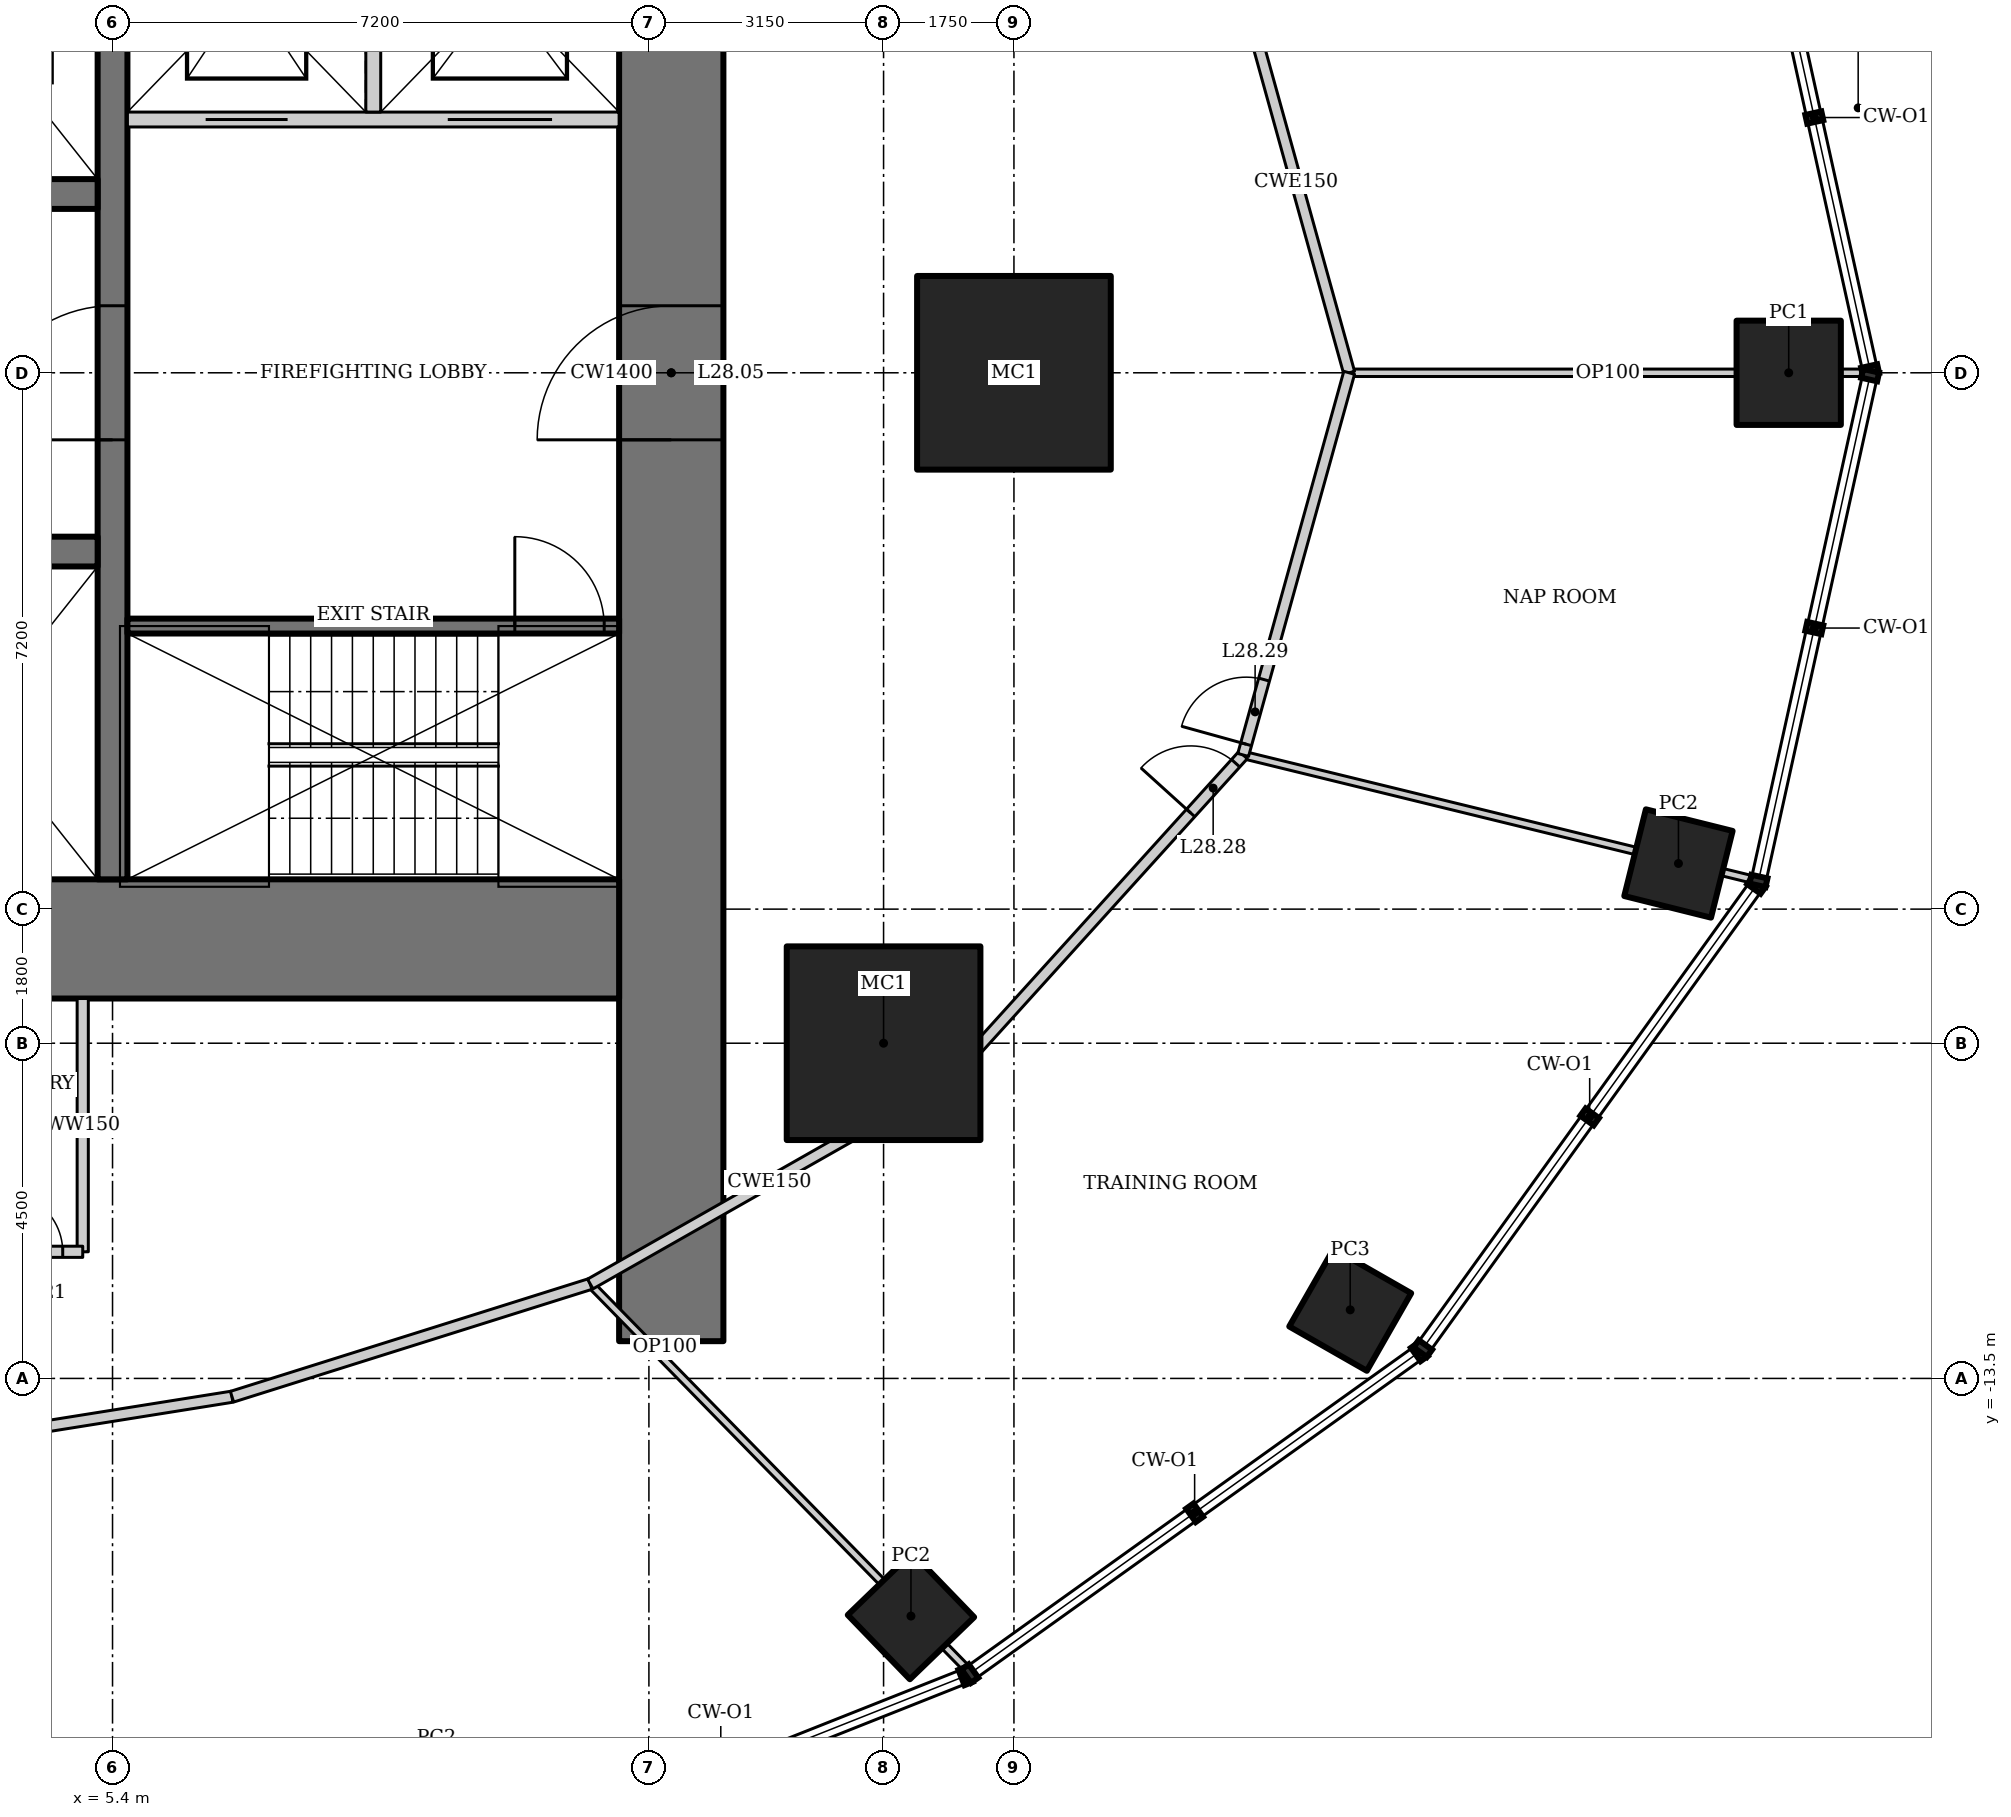
"""IFC4 building model, lengths in metres.
Left out: names, types, materials, properties, quantities, classifications, styles, units other than length and angle.
Written with IfcOpenShell. Run it as: python <this file> out.ifc"""

import sys

from ifc_helpers import new_model, si_unit, direction, frame, frame_2d, origin, origin_2d, place, context, subcontext, project, spatial, rectangle, hollow_rectangle, extrude, element, fill, save


model = new_model("IFC4")
c1 = context("Model", 3, precision=1e-05, world=origin(), true_north=direction((0.0, 1.0)))
c2 = subcontext(c1, "Body", "Model", "MODEL_VIEW")
j1 = project(units=[si_unit("LENGTHUNIT", "METRE"), si_unit("PLANEANGLEUNIT", "RADIAN")], contexts=[c1])
p1 = place(None, origin())
s1 = spatial("IfcSite", under=j1, at=p1, CompositionType="ELEMENT")
p2 = place(p1, origin())
s2 = spatial("IfcBuilding", under=s1, at=p2, CompositionType="ELEMENT")
p3 = place(p2, frame((0.0, 0.0, 121.6)))
s3 = spatial("IfcBuildingStorey", under=s2, at=p3, CompositionType="ELEMENT", Elevation=121.6)
for number, where, z_axis, x_axis in (
    (1, (17.5, 0.0, 0.0), (0.0, 0.0, 1.0), (1.0, 0.0, 0.0)),
    (2, (15.75, -9.0, 0.0), (0.0, 0.0, 1.0), (1.0, 0.0, 0.0)),
):
    element("IfcColumn", number, at=place(p3, frame(where, z_axis=z_axis, x_axis=x_axis)), inside=s3, PredefinedType="COLUMN", context=c2, shape_type="SweptSolid", body=[
        extrude(hollow_rectangle(XDim=2.6, YDim=2.6, WallThickness=0.13, at=origin_2d()), origin(), (0.0, 0.0, 1.0), 4.2),
    ])
p4 = place(p3, frame((27.9, 0.0, 0.0), z_axis=(0.0, 0.0, 1.0), x_axis=(1.0, 0.0, 0.0)))
e3 = element("IfcColumn", 3, at=p4, inside=s3, PredefinedType="COLUMN", context=c2, shape_type="SweptSolid", body=[
    extrude(hollow_rectangle(XDim=1.4, YDim=1.4, WallThickness=0.1, at=origin_2d()), origin(), (0.0, 0.0, 1.0), 4.2),
])
for number, where, z_axis, x_axis in (
    (4, (9.749, -19.133, 0.0), (0.0, 0.0, 1.0), (0.891, 0.454, 0.0)),
    (5, (16.118, -16.69, 0.0), (0.0, 0.0, 1.0), (0.719, 0.695, 0.0)),
):
    element("IfcColumn", number, at=place(p3, frame(where, z_axis=z_axis, x_axis=x_axis)), inside=s3, PredefinedType="COLUMN", context=c2, shape_type="SweptSolid", body=[
        extrude(hollow_rectangle(XDim=1.2, YDim=1.2, WallThickness=0.1, at=origin_2d()), origin(), (0.0, 0.0, 1.0), 4.2),
    ])
p5 = place(p3, frame((22.014, -12.579, 0.0), z_axis=(0.0, 0.0, 1.0), x_axis=(0.496139221777, 0.86824298017, 0.0)))
e6 = element("IfcColumn", 6, at=p5, inside=s3, PredefinedType="COLUMN", context=c2, shape_type="SweptSolid", body=[
    extrude(hollow_rectangle(XDim=1.2, YDim=1.2, WallThickness=0.12, at=origin_2d()), origin(), (0.0, 0.0, 1.0), 4.2),
])
p6 = place(p3, frame((26.42, -6.587, 0.0), z_axis=(0.0, 0.0, 1.0), x_axis=(0.2419218956, 0.970295726276, 0.0)))
e7 = element("IfcColumn", 7, at=p6, inside=s3, PredefinedType="COLUMN", context=c2, shape_type="SweptSolid", body=[
    extrude(hollow_rectangle(XDim=1.2, YDim=1.2, WallThickness=0.1, at=origin_2d()), origin(), (0.0, 0.0, 1.0), 4.2),
])
p7 = place(p3, frame((12.9, -13.0, 0.0), z_axis=(0.0, 0.0, 1.0), x_axis=(0.0, 1.0, 0.0)))
e8 = element("IfcWall", 8, at=p7, inside=s3, PredefinedType="SHEAR", context=c2, shape_type="SweptSolid", body=[
    extrude(rectangle(XDim=26.0, YDim=1.4, at=frame_2d((13.0, 0.0))), origin(), (0.0, 0.0, 1.0), 4.2),
])
p8 = place(p7, frame((12.1, 0.0, 0.0)))
e9 = element("IfcOpeningElement", 9, at=p8, cuts=e8, PredefinedType="OPENING", context=c2, shape_type="SweptSolid", body=[
    extrude(rectangle(XDim=1.8, YDim=2.1, at=frame_2d((0.9, 1.05))), frame((0.0, 0.71, 0.0), z_axis=(0.0, -1.0, 0.0), x_axis=(1.0, 0.0, 0.0)), (0.0, 0.0, 1.0), 1.42),
])
p9 = place(p3, frame((-12.2, -7.6, 0.0), z_axis=(0.0, 0.0, 1.0), x_axis=(1.0, 0.0, 0.0)))
e10 = element("IfcWall", 10, at=p9, inside=s3, PredefinedType="SHEAR", context=c2, shape_type="SweptSolid", body=[
    extrude(rectangle(XDim=24.4, YDim=1.6, at=frame_2d((12.2, 0.0))), origin(), (0.0, 0.0, 1.0), 4.2),
])
p10 = place(p3, frame((5.4, -6.8, 0.0), z_axis=(0.0, 0.0, 1.0), x_axis=(0.0, 1.0, 0.0)))
e11 = element("IfcWall", 11, at=p10, inside=s3, PredefinedType="SHEAR", context=c2, shape_type="SweptSolid", body=[
    extrude(rectangle(XDim=13.6, YDim=0.4, at=frame_2d((6.8, 0.0))), origin(), (0.0, 0.0, 1.0), 4.2),
])
p11 = place(p10, frame((5.9, 0.0, 0.0)))
e12 = element("IfcOpeningElement", 12, at=p11, cuts=e11, PredefinedType="OPENING", context=c2, shape_type="SweptSolid", body=[
    extrude(rectangle(XDim=1.8, YDim=2.1, at=frame_2d((0.9, 1.05))), frame((0.0, 0.21, 0.0), z_axis=(0.0, -1.0, 0.0), x_axis=(1.0, 0.0, 0.0)), (0.0, 0.0, 1.0), 0.42),
])
p12 = place(p3, frame((-5.2, -2.4, 0.0), z_axis=(0.0, 0.0, 1.0), x_axis=(1.0, 0.0, 0.0)))
e13 = element("IfcWall", 13, at=p12, inside=s3, PredefinedType="SHEAR", context=c2, shape_type="SweptSolid", body=[
    extrude(rectangle(XDim=10.4, YDim=0.4, at=frame_2d((5.2, 0.0))), origin(), (0.0, 0.0, 1.0), 4.2),
])
p13 = place(p3, frame((5.2, 2.4, 0.0), z_axis=(0.0, 0.0, 1.0), x_axis=(-1.0, 0.0, 0.0)))
e14 = element("IfcWall", 14, at=p13, inside=s3, PredefinedType="SHEAR", context=c2, shape_type="SweptSolid", body=[
    extrude(rectangle(XDim=10.4, YDim=0.4, at=frame_2d((5.2, 0.0))), origin(), (0.0, 0.0, 1.0), 4.2),
])
p14 = place(p13, frame((8.183, 0.0, 0.0)))
e15 = element("IfcOpeningElement", 15, at=p14, cuts=e14, PredefinedType="OPENING", context=c2, shape_type="SweptSolid", body=[
    extrude(rectangle(XDim=1.1, YDim=2.2, at=frame_2d((0.55, 1.1))), frame((0.0, 0.21, 0.0), z_axis=(0.0, -1.0, 0.0), x_axis=(1.0, 0.0, 0.0)), (0.0, 0.0, 1.0), 0.42),
])
p15 = place(p13, frame((4.65, 0.0, 0.0)))
e16 = element("IfcOpeningElement", 16, at=p15, cuts=e14, PredefinedType="OPENING", context=c2, shape_type="SweptSolid", body=[
    extrude(rectangle(XDim=1.1, YDim=2.2, at=frame_2d((0.55, 1.1))), frame((0.0, 0.21, 0.0), z_axis=(0.0, -1.0, 0.0), x_axis=(1.0, 0.0, 0.0)), (0.0, 0.0, 1.0), 0.42),
])
p16 = place(p13, frame((1.117, 0.0, 0.0)))
e17 = element("IfcOpeningElement", 17, at=p16, cuts=e14, PredefinedType="OPENING", context=c2, shape_type="SweptSolid", body=[
    extrude(rectangle(XDim=1.1, YDim=2.2, at=frame_2d((0.55, 1.1))), frame((0.0, 0.21, 0.0), z_axis=(0.0, -1.0, 0.0), x_axis=(1.0, 0.0, 0.0)), (0.0, 0.0, 1.0), 0.42),
])
p17 = place(p3, frame((5.6, -3.4, 0.0), z_axis=(0.0, 0.0, 1.0), x_axis=(1.0, 0.0, 0.0)))
e18 = element("IfcWall", 18, at=p17, inside=s3, PredefinedType="SHEAR", context=c2, shape_type="SweptSolid", body=[
    extrude(rectangle(XDim=6.6, YDim=0.2, at=frame_2d((3.3, 0.0))), origin(), (0.0, 0.0, 1.0), 4.2),
])
p18 = place(p17, frame((5.2, 0.0, 0.0)))
e19 = element("IfcOpeningElement", 19, at=p18, cuts=e18, PredefinedType="OPENING", context=c2, shape_type="SweptSolid", body=[
    extrude(rectangle(XDim=1.2, YDim=2.1, at=frame_2d((0.6, 1.05))), frame((0.0, 0.11, 0.0), z_axis=(0.0, -1.0, 0.0), x_axis=(1.0, 0.0, 0.0)), (0.0, 0.0, 1.0), 0.22),
])
p19 = place(p3, frame((12.2, 3.4, 0.0), z_axis=(0.0, 0.0, 1.0), x_axis=(-1.0, 0.0, 0.0)))
e20 = element("IfcWall", 20, at=p19, inside=s3, PredefinedType="SOLIDWALL", context=c2, shape_type="SweptSolid", body=[
    extrude(rectangle(XDim=6.6, YDim=0.2, at=frame_2d((3.3, 0.0))), origin(), (0.0, 0.0, 1.0), 4.2),
])
p20 = place(p19, frame((4.45, 0.0, 0.0)))
e21 = element("IfcOpeningElement", 21, at=p20, cuts=e20, PredefinedType="OPENING", context=c2, shape_type="SweptSolid", body=[
    extrude(rectangle(XDim=1.1, YDim=2.2, at=frame_2d((0.55, 1.1))), frame((0.0, 0.11, 0.0), z_axis=(0.0, -1.0, 0.0), x_axis=(1.0, 0.0, 0.0)), (0.0, 0.0, 1.0), 0.22),
])
p21 = place(p19, frame((0.9, 0.0, 0.0)))
e22 = element("IfcOpeningElement", 22, at=p21, cuts=e20, PredefinedType="OPENING", context=c2, shape_type="SweptSolid", body=[
    extrude(rectangle(XDim=1.4, YDim=2.2, at=frame_2d((0.7, 1.1))), frame((0.0, 0.11, 0.0), z_axis=(0.0, -1.0, 0.0), x_axis=(1.0, 0.0, 0.0)), (0.0, 0.0, 1.0), 0.22),
])
p22 = place(p3, frame((8.9, 3.5, 0.0), z_axis=(0.0, 0.0, 1.0), x_axis=(0.0, 1.0, 0.0)))
e23 = element("IfcWall", 23, at=p22, inside=s3, PredefinedType="SOLIDWALL", context=c2, shape_type="SweptSolid", body=[
    extrude(rectangle(XDim=3.3, YDim=0.2, at=frame_2d((1.65, 0.0))), origin(), (0.0, 0.0, 1.0), 4.2),
])
p23 = place(p3, frame((28.944, 0.0, 0.0), z_axis=(0.0, 0.0, 1.0), x_axis=(-1.0, 0.0, 0.0)))
e24 = element("IfcWall", 24, at=p23, inside=s3, PredefinedType="PARTITIONING", context=c2, shape_type="SweptSolid", body=[
    extrude(rectangle(XDim=6.944, YDim=0.1, at=frame_2d((3.472, 0.0))), origin(), (0.0, 0.0, 1.0), 3.204),
])
p24 = place(p3, frame((16.882, -17.414, 0.0), z_axis=(0.0, 0.0, 1.0), x_axis=(-0.699352142517, 0.714777294517, 0.0)))
e25 = element("IfcWall", 25, at=p24, inside=s3, PredefinedType="PARTITIONING", context=c2, shape_type="SweptSolid", body=[
    extrude(rectangle(XDim=7.249, YDim=0.1, at=frame_2d((3.625, 0.0))), origin(), (0.0, 0.0, 1.0), 3.321),
])
p25 = place(p3, frame((27.441, -6.809, 0.0), z_axis=(0.0, 0.0, 1.0), x_axis=(-0.971377572955, 0.237540755996, 0.0)))
e26 = element("IfcWall", 26, at=p25, inside=s3, PredefinedType="PARTITIONING", context=c2, shape_type="SweptSolid", body=[
    extrude(rectangle(XDim=7.066, YDim=0.1, at=frame_2d((3.533, 0.0))), origin(), (0.0, 0.0, 1.0), 3.113),
])
p26 = place(p3, frame((22.0, 0.0, 0.0), z_axis=(0.0, 0.0, 1.0), x_axis=(-0.267293817428, 0.963615076244, 0.0)))
e27 = element("IfcWall", 27, at=p26, inside=s3, PredefinedType="PARTITIONING", context=c2, shape_type="SweptSolid", body=[
    extrude(rectangle(XDim=5.324, YDim=0.15, at=frame_2d((2.662, 0.0))), origin(), (0.0, 0.0, 1.0), 4.05),
])
p27 = place(p3, frame((3.31, -14.335, 0.0), z_axis=(0.0, 0.0, 1.0), x_axis=(0.987511396594, 0.157547585181, 0.0)))
e28 = element("IfcWall", 28, at=p27, inside=s3, PredefinedType="PARTITIONING", context=c2, shape_type="SweptSolid", body=[
    extrude(rectangle(XDim=3.741, YDim=0.15, at=frame_2d((1.87, 0.0))), origin(), (0.0, 0.0, 1.0), 4.05),
])
p28 = place(p3, frame((7.004, -13.746, 0.0), z_axis=(0.0, 0.0, 1.0), x_axis=(0.953893934057, 0.300143903101, 0.0)))
e29 = element("IfcWall", 29, at=p28, inside=s3, PredefinedType="PARTITIONING", context=c2, shape_type="SweptSolid", body=[
    extrude(rectangle(XDim=5.042, YDim=0.15, at=frame_2d((2.521, 0.0))), origin(), (0.0, 0.0, 1.0), 4.05),
])
p29 = place(p3, frame((11.813, -12.232, 0.0), z_axis=(0.0, 0.0, 1.0), x_axis=(0.869375991036, 0.494151177485, 0.0)))
e30 = element("IfcWall", 30, at=p29, inside=s3, PredefinedType="PARTITIONING", context=c2, shape_type="SweptSolid", body=[
    extrude(rectangle(XDim=5.532, YDim=0.15, at=frame_2d((2.766, 0.0))), origin(), (0.0, 0.0, 1.0), 4.05),
])
p30 = place(p3, frame((16.623, -9.499, 0.0), z_axis=(0.0, 0.0, 1.0), x_axis=(0.671118353743, 0.741350224435, 0.0)))
e31 = element("IfcWall", 31, at=p30, inside=s3, PredefinedType="PARTITIONING", context=c2, shape_type="SweptSolid", body=[
    extrude(rectangle(XDim=5.892, YDim=0.15, at=frame_2d((2.946, 0.0))), origin(), (0.0, 0.0, 1.0), 4.05),
])
p31 = place(p30, frame((4.842, 0.0, 0.0)))
e32 = element("IfcOpeningElement", 32, at=p31, cuts=e31, PredefinedType="OPENING", context=c2, shape_type="SweptSolid", body=[
    extrude(rectangle(XDim=0.9, YDim=2.1, at=frame_2d((0.45, 1.05))), frame((0.0, 0.085, 0.0), z_axis=(0.0, -1.0, 0.0), x_axis=(1.0, 0.0, 0.0)), (0.0, 0.0, 1.0), 0.17),
])
p32 = place(p3, frame((20.577, -5.13, 0.0), z_axis=(0.0, 0.0, 1.0), x_axis=(0.267293817428, 0.963615076244, 0.0)))
e33 = element("IfcWall", 33, at=p32, inside=s3, PredefinedType="PARTITIONING", context=c2, shape_type="SweptSolid", body=[
    extrude(rectangle(XDim=5.324, YDim=0.15, at=frame_2d((2.662, 0.0))), origin(), (0.0, 0.0, 1.0), 4.05),
])
p33 = place(p32, frame((0.15, 0.0, 0.0)))
e34 = element("IfcOpeningElement", 34, at=p33, cuts=e33, PredefinedType="OPENING", context=c2, shape_type="SweptSolid", body=[
    extrude(rectangle(XDim=0.9, YDim=2.1, at=frame_2d((0.45, 1.05))), frame((0.0, 0.085, 0.0), z_axis=(0.0, -1.0, 0.0), x_axis=(1.0, 0.0, 0.0)), (0.0, 0.0, 1.0), 0.17),
])
p34 = place(p3, frame((5.0, -8.4, 0.0), z_axis=(0.0, 0.0, 1.0), x_axis=(0.0, -1.0, 0.0)))
e35 = element("IfcWall", 35, at=p34, inside=s3, PredefinedType="SOLIDWALL", context=c2, shape_type="SweptSolid", body=[
    extrude(rectangle(XDim=3.4, YDim=0.15, at=frame_2d((1.7, 0.0))), origin(), (0.0, 0.0, 1.0), 4.05),
])
p35 = place(p3, frame((12.9, -13.0, 0.0), z_axis=(0.0, 0.0, 1.0), x_axis=(-0.714690391061, -0.699440951707, 0.0)))
e36 = element("IfcWall", 36, at=p35, inside=s3, PredefinedType="PARTITIONING", context=c2, shape_type="SweptSolid", body=[
    extrude(rectangle(XDim=0.24, YDim=0.1, at=frame_2d((0.12, 0.0))), origin(), (0.0, 0.0, 1.0), 4.05),
])
p36 = place(p3, frame((2.131, -11.8, 0.0), z_axis=(0.0, 0.0, 1.0), x_axis=(1.0, 0.0, 0.0)))
e37 = element("IfcWall", 37, at=p36, inside=s3, PredefinedType="SOLIDWALL", context=c2, shape_type="SweptSolid", body=[
    extrude(rectangle(XDim=2.869, YDim=0.15, at=frame_2d((1.434, 0.0))), origin(), (0.0, 0.0, 1.0), 4.05),
])
p37 = place(p36, frame((0.1, 0.0, 0.0)))
e38 = element("IfcOpeningElement", 38, at=p37, cuts=e37, PredefinedType="OPENING", context=c2, shape_type="SweptSolid", body=[
    extrude(rectangle(XDim=1.0, YDim=2.1, at=frame_2d((0.5, 1.05))), frame((0.0, 0.085, 0.0), z_axis=(0.0, -1.0, 0.0), x_axis=(1.0, 0.0, 0.0)), (0.0, 0.0, 1.0), 0.17),
])
p38 = place(p36, frame((1.8, 0.0, 0.0)))
e39 = element("IfcOpeningElement", 39, at=p38, cuts=e37, PredefinedType="OPENING", context=c2, shape_type="SweptSolid", body=[
    extrude(rectangle(XDim=0.8, YDim=2.1, at=frame_2d((0.4, 1.05))), frame((0.0, 0.085, 0.0), z_axis=(0.0, -1.0, 0.0), x_axis=(1.0, 0.0, 0.0)), (0.0, 0.0, 1.0), 0.17),
])
p39 = place(p11, origin())
e40 = element("IfcDoor", 40, at=p39, inside=s3, OperationType="DOUBLE_DOOR_DOUBLE_SWING", PredefinedType="DOOR", context=c2, shape_type="SweptSolid", body=[
    extrude(rectangle(XDim=1.8, YDim=2.1, at=frame_2d((0.9, 1.05))), frame((0.0, 0.025, 0.0), z_axis=(0.0, -1.0, 0.0), x_axis=(1.0, 0.0, 0.0)), (0.0, 0.0, 1.0), 0.05),
])
fill(e12, e40)
p40 = place(p18, origin())
e41 = element("IfcDoor", 41, at=p40, inside=s3, OperationType="SINGLE_SWING_RIGHT", PredefinedType="DOOR", context=c2, shape_type="SweptSolid", body=[
    extrude(rectangle(XDim=1.2, YDim=2.1, at=frame_2d((0.6, 1.05))), frame((0.0, 0.025, 0.0), z_axis=(0.0, -1.0, 0.0), x_axis=(1.0, 0.0, 0.0)), (0.0, 0.0, 1.0), 0.05),
])
fill(e19, e41)
p41 = place(p8, origin())
e42 = element("IfcDoor", 42, at=p41, inside=s3, OperationType="DOUBLE_DOOR_DOUBLE_SWING", PredefinedType="DOOR", context=c2, shape_type="SweptSolid", body=[
    extrude(rectangle(XDim=1.8, YDim=2.1, at=frame_2d((0.9, 1.05))), frame((0.0, 0.025, 0.0), z_axis=(0.0, -1.0, 0.0), x_axis=(1.0, 0.0, 0.0)), (0.0, 0.0, 1.0), 0.05),
])
fill(e9, e42)
p42 = place(p20, origin())
e43 = element("IfcDoor", 43, at=p42, inside=s3, OperationType="DOUBLE_DOOR_SLIDING", PredefinedType="DOOR", context=c2, shape_type="SweptSolid", body=[
    extrude(rectangle(XDim=1.1, YDim=2.2, at=frame_2d((0.55, 1.1))), frame((0.0, 0.025, 0.0), z_axis=(0.0, -1.0, 0.0), x_axis=(1.0, 0.0, 0.0)), (0.0, 0.0, 1.0), 0.05),
])
fill(e21, e43)
p43 = place(p21, origin())
e44 = element("IfcDoor", 44, at=p43, inside=s3, OperationType="DOUBLE_DOOR_SLIDING", PredefinedType="DOOR", context=c2, shape_type="SweptSolid", body=[
    extrude(rectangle(XDim=1.4, YDim=2.2, at=frame_2d((0.7, 1.1))), frame((0.0, 0.025, 0.0), z_axis=(0.0, -1.0, 0.0), x_axis=(1.0, 0.0, 0.0)), (0.0, 0.0, 1.0), 0.05),
])
fill(e22, e44)
p44 = place(p38, origin())
e45 = element("IfcDoor", 45, at=p44, inside=s3, OperationType="SINGLE_SWING_LEFT", PredefinedType="DOOR", context=c2, shape_type="SweptSolid", body=[
    extrude(rectangle(XDim=0.8, YDim=2.1, at=frame_2d((0.4, 1.05))), frame((0.0, 0.025, 0.0), z_axis=(0.0, -1.0, 0.0), x_axis=(1.0, 0.0, 0.0)), (0.0, 0.0, 1.0), 0.05),
])
fill(e39, e45)
p45 = place(p31, origin())
e46 = element("IfcDoor", 46, at=p45, inside=s3, OperationType="SINGLE_SWING_LEFT", PredefinedType="DOOR", context=c2, shape_type="SweptSolid", body=[
    extrude(rectangle(XDim=0.9, YDim=2.1, at=frame_2d((0.45, 1.05))), frame((0.0, 0.025, 0.0), z_axis=(0.0, -1.0, 0.0), x_axis=(1.0, 0.0, 0.0)), (0.0, 0.0, 1.0), 0.05),
])
fill(e32, e46)
p46 = place(p33, origin())
e47 = element("IfcDoor", 47, at=p46, inside=s3, OperationType="SINGLE_SWING_LEFT", PredefinedType="DOOR", context=c2, shape_type="SweptSolid", body=[
    extrude(rectangle(XDim=0.9, YDim=2.1, at=frame_2d((0.45, 1.05))), frame((0.0, 0.025, 0.0), z_axis=(0.0, -1.0, 0.0), x_axis=(1.0, 0.0, 0.0)), (0.0, 0.0, 1.0), 0.05),
])
fill(e34, e47)
save(model, sys.argv[1])
